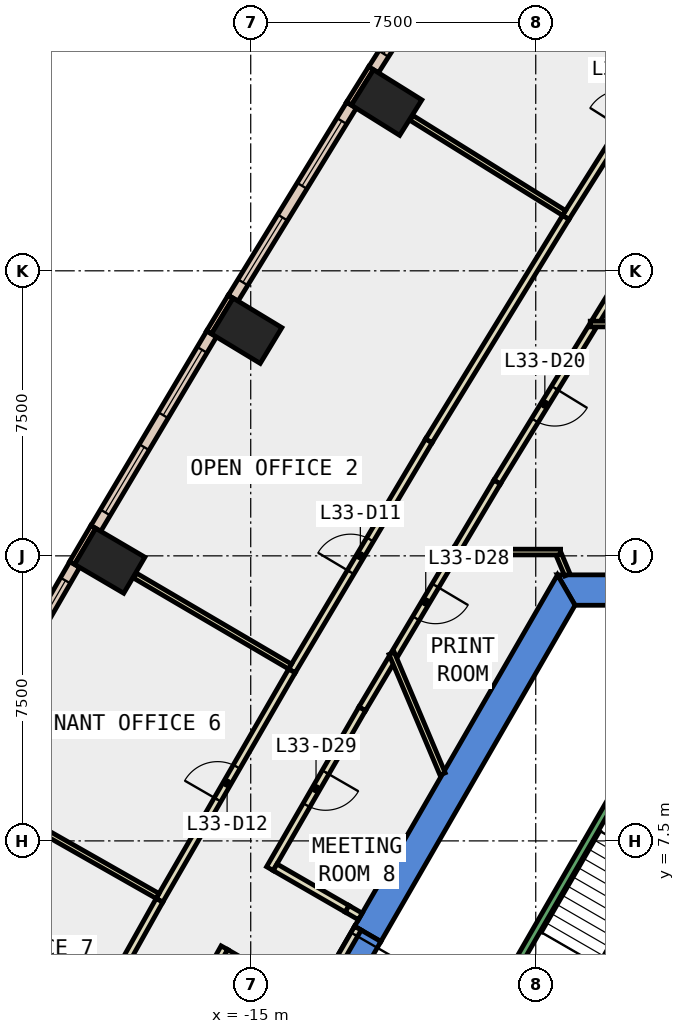
"""IFC4 building model, lengths in metres.
Left out: names, types, materials, properties, quantities, classifications, styles, units other than length and angle.
Written with IfcOpenShell. Run it as: python <this file> out.ifc"""

import sys

from ifc_helpers import new_model, si_unit, direction, frame, frame_2d, origin, origin_2d, place, context, subcontext, project, spatial, polyline, rectangle, outline, extrude, element, fill, save


model = new_model("IFC4")
c1 = context("Model", 3, precision=1e-05, world=origin(), true_north=direction((0.0, 1.0)))
c2 = subcontext(c1, "Body", "Model", "MODEL_VIEW")
j1 = project(units=[si_unit("LENGTHUNIT", "METRE"), si_unit("PLANEANGLEUNIT", "RADIAN")], contexts=[c1])
p1 = place(None, origin())
s1 = spatial("IfcSite", under=j1, at=p1, CompositionType="ELEMENT")
p2 = place(p1, origin())
s2 = spatial("IfcBuilding", under=s1, at=p2, CompositionType="ELEMENT")
p3 = place(p2, frame((0.0, 0.0, 150.8)))
s3 = spatial("IfcBuildingStorey", under=s2, at=p3, CompositionType="ELEMENT", Elevation=150.8)
for number, where, z_axis, x_axis in (
    (1, (-11.425, 26.928, -0.4), (0.0, 0.0, 1.0), (0.53, 0.848, 0.0)),
    (2, (-15.107, 20.923, -0.4), (0.0, 0.0, 1.0), (0.518, 0.855, 0.0)),
    (3, (-18.71, 14.87, -0.4), (0.0, 0.0, 1.0), (0.506, 0.863, 0.0)),
):
    element("IfcColumn", number, at=place(p3, frame(where, z_axis=z_axis, x_axis=x_axis)), inside=s3, PredefinedType="COLUMN", context=c2, shape_type="SweptSolid", body=[
        extrude(rectangle(XDim=1.1, YDim=1.5, at=origin_2d()), origin(), (0.0, 0.0, 1.0), 4.2),
    ])
p4 = place(p3, frame((0.0, 0.0, -0.4)))
e4 = element("IfcWall", 4, at=p4, inside=s3, PredefinedType="SHEAR", context=c2, shape_type="SweptSolid", body=[
    extrude(outline(polyline([(6.928, 14.5), (-6.928, 14.5), (-6.466, 13.7), (6.466, 13.7), (6.928, 14.5)])), origin(), (0.0, 0.0, 1.0), 4.2),
])
p5 = place(p3, frame((0.0, 0.0, -0.4)))
e5 = element("IfcWall", 5, at=p5, inside=s3, PredefinedType="SHEAR", context=c2, shape_type="SweptSolid", body=[
    extrude(outline(polyline([(-12.267, 5.252), (-11.575, 4.852), (-6.466, 13.7), (-6.928, 14.5), (-12.267, 5.252)])), origin(), (0.0, 0.0, 1.0), 4.2),
])
p6 = place(p3, frame((0.0, 0.0, 3.6)))
e6 = element("IfcWall", 6, at=p6, inside=s3, PredefinedType="SHEAR", context=c2, shape_type="SweptSolid", body=[
    extrude(outline(polyline([(-13.267, 3.52), (-12.575, 3.12), (-11.575, 4.852), (-12.267, 5.252), (-13.267, 3.52)])), origin(), (0.0, 0.0, 1.0), 0.2),
])
for number, where, z_axis, x_axis in (
    (7, (-11.833, 27.832, 0.0), (0.0, 0.0, 1.0), (-0.53, -0.848, 0.0)),
    (8, (-15.528, 21.821, 0.0), (0.0, 0.0, 1.0), (-0.518, -0.855, 0.0)),
):
    element("IfcWall", number, at=place(p3, frame(where, z_axis=z_axis, x_axis=x_axis)), inside=s3, PredefinedType="STANDARD", context=c2, shape_type="SweptSolid", body=[
        extrude(rectangle(XDim=1.1, YDim=0.15, at=frame_2d((0.55, 0.0))), origin(), (0.0, 0.0, 1.0), 3.8),
    ])
p7 = place(p3, frame((-19.143, 15.761, 0.0), z_axis=(0.0, 0.0, 1.0), x_axis=(-0.506505715302, -0.862236603472, 0.0)))
e9 = element("IfcWall", 9, at=p7, inside=s3, PredefinedType="STANDARD", context=c2, shape_type="SweptSolid", body=[
    extrude(rectangle(XDim=1.099, YDim=0.15, at=frame_2d((0.55, 0.0))), origin(), (0.0, 0.0, 1.0), 3.8),
])
p8 = place(p3, frame((-8.566, 32.855, 0.0), z_axis=(0.0, 0.0, 1.0), x_axis=(-0.534262775953, -0.845318452556, 0.0)))
e10 = element("IfcWall", 10, at=p8, inside=s3, PredefinedType="STANDARD", context=c2, shape_type="SweptSolid", body=[
    extrude(rectangle(XDim=5.992, YDim=0.3, at=frame_2d((2.996, 0.0))), origin(), (0.0, 0.0, 1.0), 3.8),
])
p9 = place(p8, frame((0.498, 0.0, 0.9)))
e11 = element("IfcOpeningElement", 11, at=p9, cuts=e10, PredefinedType="OPENING", context=c2, shape_type="SweptSolid", body=[
    extrude(rectangle(XDim=2.0, YDim=2.6, at=frame_2d((1.0, 1.3))), frame((0.0, 0.16, 0.0), z_axis=(0.0, -1.0, 0.0), x_axis=(1.0, 0.0, 0.0)), (0.0, 0.0, 1.0), 0.32),
])
p10 = place(p8, frame((3.494, 0.0, 0.9)))
e12 = element("IfcOpeningElement", 12, at=p10, cuts=e10, PredefinedType="OPENING", context=c2, shape_type="SweptSolid", body=[
    extrude(rectangle(XDim=2.0, YDim=2.6, at=frame_2d((1.0, 1.3))), frame((0.0, 0.16, 0.0), z_axis=(0.0, -1.0, 0.0), x_axis=(1.0, 0.0, 0.0)), (0.0, 0.0, 1.0), 0.32),
])
p11 = place(p3, frame((-12.348, 26.858, 0.0), z_axis=(0.0, 0.0, 1.0), x_axis=(-0.522704272908, -0.852514072074, 0.0)))
e13 = element("IfcWall", 13, at=p11, inside=s3, PredefinedType="STANDARD", context=c2, shape_type="SweptSolid", body=[
    extrude(rectangle(XDim=5.958, YDim=0.3, at=frame_2d((2.979, 0.0))), origin(), (0.0, 0.0, 1.0), 3.8),
])
p12 = place(p11, frame((0.489, 0.0, 0.9)))
e14 = element("IfcOpeningElement", 14, at=p12, cuts=e13, PredefinedType="OPENING", context=c2, shape_type="SweptSolid", body=[
    extrude(rectangle(XDim=2.0, YDim=2.6, at=frame_2d((1.0, 1.3))), frame((0.0, 0.16, 0.0), z_axis=(0.0, -1.0, 0.0), x_axis=(1.0, 0.0, 0.0)), (0.0, 0.0, 1.0), 0.32),
])
p13 = place(p11, frame((3.468, 0.0, 0.9)))
e15 = element("IfcOpeningElement", 15, at=p13, cuts=e13, PredefinedType="OPENING", context=c2, shape_type="SweptSolid", body=[
    extrude(rectangle(XDim=2.0, YDim=2.6, at=frame_2d((1.0, 1.3))), frame((0.0, 0.16, 0.0), z_axis=(0.0, -1.0, 0.0), x_axis=(1.0, 0.0, 0.0)), (0.0, 0.0, 1.0), 0.32),
])
p14 = place(p3, frame((-16.029, 20.84, 0.0), z_axis=(0.0, 0.0, 1.0), x_axis=(-0.511455040009, -0.859310038374, 0.0)))
e16 = element("IfcWall", 16, at=p14, inside=s3, PredefinedType="STANDARD", context=c2, shape_type="SweptSolid", body=[
    extrude(rectangle(XDim=5.957, YDim=0.3, at=frame_2d((2.979, 0.0))), origin(), (0.0, 0.0, 1.0), 3.8),
])
p15 = place(p14, frame((0.489, 0.0, 0.9)))
e17 = element("IfcOpeningElement", 17, at=p15, cuts=e16, PredefinedType="OPENING", context=c2, shape_type="SweptSolid", body=[
    extrude(rectangle(XDim=2.0, YDim=2.6, at=frame_2d((1.0, 1.3))), frame((0.0, 0.16, 0.0), z_axis=(0.0, -1.0, 0.0), x_axis=(1.0, 0.0, 0.0)), (0.0, 0.0, 1.0), 0.32),
])
p16 = place(p14, frame((3.468, 0.0, 0.9)))
e18 = element("IfcOpeningElement", 18, at=p16, cuts=e16, PredefinedType="OPENING", context=c2, shape_type="SweptSolid", body=[
    extrude(rectangle(XDim=2.0, YDim=2.6, at=frame_2d((1.0, 1.3))), frame((0.0, 0.16, 0.0), z_axis=(0.0, -1.0, 0.0), x_axis=(1.0, 0.0, 0.0)), (0.0, 0.0, 1.0), 0.32),
])
p17 = place(p3, frame((-19.631, 14.774, 0.0), z_axis=(0.0, 0.0, 1.0), x_axis=(-0.500061823953, -0.865989706766, 0.0)))
e19 = element("IfcWall", 19, at=p17, inside=s3, PredefinedType="STANDARD", context=c2, shape_type="SweptSolid", body=[
    extrude(rectangle(XDim=5.957, YDim=0.3, at=frame_2d((2.979, 0.0))), origin(), (0.0, 0.0, 1.0), 3.8),
])
p18 = place(p17, frame((0.489, 0.0, 0.9)))
e20 = element("IfcOpeningElement", 20, at=p18, cuts=e19, PredefinedType="OPENING", context=c2, shape_type="SweptSolid", body=[
    extrude(rectangle(XDim=2.0, YDim=2.6, at=frame_2d((1.0, 1.3))), frame((0.0, 0.16, 0.0), z_axis=(0.0, -1.0, 0.0), x_axis=(1.0, 0.0, 0.0)), (0.0, 0.0, 1.0), 0.32),
])
p19 = place(p17, frame((3.468, 0.0, 0.9)))
e21 = element("IfcOpeningElement", 21, at=p19, cuts=e19, PredefinedType="OPENING", context=c2, shape_type="SweptSolid", body=[
    extrude(rectangle(XDim=2.0, YDim=2.6, at=frame_2d((1.0, 1.3))), frame((0.0, 0.16, 0.0), z_axis=(0.0, -1.0, 0.0), x_axis=(1.0, 0.0, 0.0)), (0.0, 0.0, 1.0), 0.32),
])
p20 = place(p3, frame((-9.574, 15.164, 0.0), z_axis=(0.0, 0.0, 1.0), x_axis=(-0.511482522046, -0.859293680671, 0.0)))
e22 = element("IfcWall", 22, at=p20, inside=s3, PredefinedType="PARTITIONING", context=c2, shape_type="SweptSolid", body=[
    extrude(rectangle(XDim=3.208, YDim=0.2, at=frame_2d((1.604, 0.0))), origin(), (0.0, 0.0, 1.0), 3.8),
])
p21 = place(p20, frame((1.104, 0.0, 0.0)))
e23 = element("IfcOpeningElement", 23, at=p21, cuts=e22, PredefinedType="OPENING", context=c2, shape_type="SweptSolid", body=[
    extrude(rectangle(XDim=1.0, YDim=2.1, at=frame_2d((0.5, 1.05))), frame((0.0, 0.11, 0.0), z_axis=(0.0, -1.0, 0.0), x_axis=(1.0, 0.0, 0.0)), (0.0, 0.0, 1.0), 0.22),
])
p22 = place(p3, frame((-11.291, 12.278, 0.0), z_axis=(0.0, 0.0, 1.0), x_axis=(-0.511628198266, -0.859206952217, 0.0)))
e24 = element("IfcWall", 24, at=p22, inside=s3, PredefinedType="PARTITIONING", context=c2, shape_type="SweptSolid", body=[
    extrude(rectangle(XDim=1.517, YDim=0.2, at=frame_2d((0.758, 0.0))), origin(), (0.0, 0.0, 1.0), 3.8),
])
p23 = place(p3, frame((-12.067, 10.975, 0.0), z_axis=(0.0, 0.0, 1.0), x_axis=(-0.500215616273, -0.865900881878, 0.0)))
e25 = element("IfcWall", 25, at=p23, inside=s3, PredefinedType="PARTITIONING", context=c2, shape_type="SweptSolid", body=[
    extrude(rectangle(XDim=4.856, YDim=0.2, at=frame_2d((2.428, 0.0))), origin(), (0.0, 0.0, 1.0), 3.8),
])
p24 = place(p23, frame((1.928, 0.0, 0.0)))
e26 = element("IfcOpeningElement", 26, at=p24, cuts=e25, PredefinedType="OPENING", context=c2, shape_type="SweptSolid", body=[
    extrude(rectangle(XDim=1.0, YDim=2.1, at=frame_2d((0.5, 1.05))), frame((0.0, 0.11, 0.0), z_axis=(0.0, -1.0, 0.0), x_axis=(1.0, 0.0, 0.0)), (0.0, 0.0, 1.0), 0.22),
])
p25 = place(p3, frame((-14.359, 6.806, 0.0), z_axis=(0.0, 0.0, 1.0), x_axis=(0.866155875717, -0.499773947861, 0.0)))
e27 = element("IfcWall", 27, at=p25, inside=s3, PredefinedType="PARTITIONING", context=c2, shape_type="SweptSolid", body=[
    extrude(rectangle(XDim=2.189, YDim=0.2, at=frame_2d((1.094, 0.0))), origin(), (0.0, 0.0, 1.0), 3.8),
])
p26 = place(p3, frame((-6.005, 21.036, 0.0), z_axis=(0.0, 0.0, 1.0), x_axis=(-0.522865983217, -0.852414901086, 0.0)))
e28 = element("IfcWall", 28, at=p26, inside=s3, PredefinedType="PARTITIONING", context=c2, shape_type="SweptSolid", body=[
    extrude(rectangle(XDim=4.803, YDim=0.2, at=frame_2d((2.401, 0.0))), origin(), (0.0, 0.0, 1.0), 3.8),
])
p27 = place(p26, frame((1.901, 0.0, 0.0)))
e29 = element("IfcOpeningElement", 29, at=p27, cuts=e28, PredefinedType="OPENING", context=c2, shape_type="SweptSolid", body=[
    extrude(rectangle(XDim=1.0, YDim=2.1, at=frame_2d((0.5, 1.05))), frame((0.0, 0.11, 0.0), z_axis=(0.0, -1.0, 0.0), x_axis=(1.0, 0.0, 0.0)), (0.0, 0.0, 1.0), 0.22),
])
p28 = place(p3, frame((-8.516, 16.942, 0.0), z_axis=(0.0, 0.0, 1.0), x_axis=(-0.511351070319, -0.859371911854, 0.0)))
e30 = element("IfcWall", 30, at=p28, inside=s3, PredefinedType="PARTITIONING", context=c2, shape_type="SweptSolid", body=[
    extrude(rectangle(XDim=2.069, YDim=0.2, at=frame_2d((1.034, 0.0))), origin(), (0.0, 0.0, 1.0), 3.8),
])
p29 = place(p3, frame((-4.887, 22.86, 0.0), z_axis=(0.0, 0.0, 1.0), x_axis=(-0.522754838565, -0.852483066552, 0.0)))
e31 = element("IfcWall", 31, at=p29, inside=s3, PredefinedType="PARTITIONING", context=c2, shape_type="SweptSolid", body=[
    extrude(rectangle(XDim=1.99, YDim=0.2, at=frame_2d((0.995, 0.0))), origin(), (0.0, 0.0, 1.0), 3.8),
])
p30 = place(p3, frame((-15.692, 4.689, 0.0), z_axis=(0.0, 0.0, 1.0), x_axis=(-0.48849233301, -0.872568186786, 0.0)))
e32 = element("IfcWall", 32, at=p30, inside=s3, PredefinedType="PARTITIONING", context=c2, shape_type="SweptSolid", body=[
    extrude(rectangle(XDim=6.629, YDim=0.2, at=frame_2d((3.314, 0.0))), origin(), (0.0, 0.0, 1.0), 3.8),
])
p31 = place(p30, frame((2.814, 0.0, 0.0)))
e33 = element("IfcOpeningElement", 33, at=p31, cuts=e32, PredefinedType="OPENING", context=c2, shape_type="SweptSolid", body=[
    extrude(rectangle(XDim=1.0, YDim=2.1, at=frame_2d((0.5, 1.05))), frame((0.0, 0.11, 0.0), z_axis=(0.0, -1.0, 0.0), x_axis=(1.0, 0.0, 0.0)), (0.0, 0.0, 1.0), 0.22),
])
p32 = place(p3, frame((-6.71, 23.906, 0.0), z_axis=(0.0, 0.0, 1.0), x_axis=(0.534211624298, 0.845350779538, 0.0)))
e34 = element("IfcWall", 34, at=p32, inside=s3, PredefinedType="PARTITIONING", context=c2, shape_type="SweptSolid", body=[
    extrude(rectangle(XDim=6.553, YDim=0.2, at=frame_2d((3.277, 0.0))), origin(), (0.0, 0.0, 1.0), 3.8),
])
p33 = place(p32, frame((2.777, 0.0, 0.0)))
e35 = element("IfcOpeningElement", 35, at=p33, cuts=e34, PredefinedType="OPENING", context=c2, shape_type="SweptSolid", body=[
    extrude(rectangle(XDim=1.0, YDim=2.1, at=frame_2d((0.5, 1.05))), frame((0.0, 0.11, 0.0), z_axis=(0.0, -1.0, 0.0), x_axis=(1.0, 0.0, 0.0)), (0.0, 0.0, 1.0), 0.22),
])
p34 = place(p3, frame((-13.917, 11.973, 0.0), z_axis=(0.0, 0.0, 1.0), x_axis=(0.511455840413, 0.859309561978, 0.0)))
e36 = element("IfcWall", 36, at=p34, inside=s3, PredefinedType="PARTITIONING", context=c2, shape_type="SweptSolid", body=[
    extrude(rectangle(XDim=7.047, YDim=0.2, at=frame_2d((3.523, 0.0))), origin(), (0.0, 0.0, 1.0), 3.8),
])
p35 = place(p34, frame((3.023, 0.0, 0.0)))
e37 = element("IfcOpeningElement", 37, at=p35, cuts=e36, PredefinedType="OPENING", context=c2, shape_type="SweptSolid", body=[
    extrude(rectangle(XDim=1.0, YDim=2.1, at=frame_2d((0.5, 1.05))), frame((0.0, 0.11, 0.0), z_axis=(0.0, -1.0, 0.0), x_axis=(1.0, 0.0, 0.0)), (0.0, 0.0, 1.0), 0.22),
])
p36 = place(p3, frame((-10.313, 18.028, 0.0), z_axis=(0.0, 0.0, 1.0), x_axis=(0.522772968793, 0.85247194857, 0.0)))
e38 = element("IfcWall", 38, at=p36, inside=s3, PredefinedType="PARTITIONING", context=c2, shape_type="SweptSolid", body=[
    extrude(rectangle(XDim=6.894, YDim=0.2, at=frame_2d((3.447, 0.0))), origin(), (0.0, 0.0, 1.0), 3.8),
])
p37 = place(p3, frame((-17.402, 5.936, 0.0), z_axis=(0.0, 0.0, 1.0), x_axis=(0.500135788517, 0.865946992052, 0.0)))
e39 = element("IfcWall", 39, at=p37, inside=s3, PredefinedType="PARTITIONING", context=c2, shape_type="SweptSolid", body=[
    extrude(rectangle(XDim=6.97, YDim=0.2, at=frame_2d((3.485, 0.0))), origin(), (0.0, 0.0, 1.0), 3.8),
])
p38 = place(p37, frame((3.06, 0.0, 0.0)))
e40 = element("IfcOpeningElement", 40, at=p38, cuts=e39, PredefinedType="OPENING", context=c2, shape_type="SweptSolid", body=[
    extrude(rectangle(XDim=1.0, YDim=2.1, at=frame_2d((0.5, 1.05))), frame((0.0, 0.11, 0.0), z_axis=(0.0, -1.0, 0.0), x_axis=(1.0, 0.0, 0.0)), (0.0, 0.0, 1.0), 0.22),
])
p39 = place(p3, frame((-20.769, -0.082, 0.0), z_axis=(0.0, 0.0, 1.0), x_axis=(0.488387759141, 0.872626722443, 0.0)))
e41 = element("IfcWall", 41, at=p39, inside=s3, PredefinedType="PARTITIONING", context=c2, shape_type="SweptSolid", body=[
    extrude(rectangle(XDim=6.896, YDim=0.2, at=frame_2d((3.448, 0.0))), origin(), (0.0, 0.0, 1.0), 3.8),
])
p40 = place(p3, frame((-9.952, 9.262, 0.0), z_axis=(0.0, 0.0, 1.0), x_axis=(-0.38905491579, 0.921214563769, 0.0)))
e42 = element("IfcWall", 42, at=p40, inside=s3, PredefinedType="PARTITIONING", context=c2, shape_type="SweptSolid", body=[
    extrude(rectangle(XDim=3.445, YDim=0.15, at=frame_2d((1.722, 0.0))), origin(), (0.0, 0.0, 1.0), 3.8),
])
p41 = place(p3, frame((-6.846, 15.1, 0.0), z_axis=(0.0, 0.0, 1.0), x_axis=(-1.0, 0.0, 0.0)))
e43 = element("IfcWall", 43, at=p41, inside=s3, PredefinedType="PARTITIONING", context=c2, shape_type="SweptSolid", body=[
    extrude(rectangle(XDim=2.766, YDim=0.15, at=frame_2d((1.383, 0.0))), origin(), (0.0, 0.0, 1.0), 3.8),
])
p42 = place(p3, frame((-6.668, 14.5, 0.0), z_axis=(0.0, 0.0, 1.0), x_axis=(-0.388852201086, 0.921300149631, 0.0)))
e44 = element("IfcWall", 44, at=p42, inside=s3, PredefinedType="PARTITIONING", context=c2, shape_type="SweptSolid", body=[
    extrude(rectangle(XDim=0.576, YDim=0.15, at=frame_2d((0.288, 0.0))), origin(), (0.0, 0.0, 1.0), 3.8),
])
p43 = place(p3, frame((-6.066, 21.1, 0.0), z_axis=(0.0, 0.0, 1.0), x_axis=(1.0, 0.0, 0.0)))
e45 = element("IfcWall", 45, at=p43, inside=s3, PredefinedType="PARTITIONING", context=c2, shape_type="SweptSolid", body=[
    extrude(rectangle(XDim=5.666, YDim=0.15, at=frame_2d((2.833, 0.0))), origin(), (0.0, 0.0, 1.0), 3.8),
])
p44 = place(p3, frame((-6.755, 24.023, 0.0), z_axis=(0.0, 0.0, 1.0), x_axis=(-0.848896034983, 0.528559856392, 0.0)))
e46 = element("IfcWall", 46, at=p44, inside=s3, PredefinedType="PARTITIONING", context=c2, shape_type="SweptSolid", body=[
    extrude(rectangle(XDim=4.73, YDim=0.15, at=frame_2d((2.365, 0.0))), origin(), (0.0, 0.0, 1.0), 3.8),
])
p45 = place(p3, frame((-13.965, 12.088, 0.0), z_axis=(0.0, 0.0, 1.0), x_axis=(-0.862617990649, 0.50585591052, 0.0)))
e47 = element("IfcWall", 47, at=p45, inside=s3, PredefinedType="PARTITIONING", context=c2, shape_type="SweptSolid", body=[
    extrude(rectangle(XDim=4.731, YDim=0.15, at=frame_2d((2.365, 0.0))), origin(), (0.0, 0.0, 1.0), 3.8),
])
p46 = place(p3, frame((-17.451, 6.051, 0.0), z_axis=(0.0, 0.0, 1.0), x_axis=(-0.869409691741, 0.494091882049, 0.0)))
e48 = element("IfcWall", 48, at=p46, inside=s3, PredefinedType="PARTITIONING", context=c2, shape_type="SweptSolid", body=[
    extrude(rectangle(XDim=4.73, YDim=0.15, at=frame_2d((2.365, 0.0))), origin(), (0.0, 0.0, 1.0), 3.8),
])
p47 = place(p3, frame((-12.18, 5.202, 0.0), z_axis=(0.0, 0.0, 1.0), x_axis=(-0.50002537861, -0.866010750942, 0.0)))
e49 = element("IfcWall", 49, at=p47, inside=s3, PredefinedType="PARTITIONING", context=c2, shape_type="SweptSolid", body=[
    extrude(rectangle(XDim=2.0, YDim=0.2, at=frame_2d((1.0, 0.0))), origin(), (0.0, 0.0, 1.0), 2.4),
])
p48 = place(p47, frame((0.19, 0.0, 0.0)))
e50 = element("IfcOpeningElement", 50, at=p48, cuts=e49, PredefinedType="OPENING", context=c2, shape_type="SweptSolid", body=[
    extrude(rectangle(XDim=1.8, YDim=2.1, at=frame_2d((0.9, 1.05))), frame((0.0, 0.11, 0.0), z_axis=(0.0, -1.0, 0.0), x_axis=(1.0, 0.0, 0.0)), (0.0, 0.0, 1.0), 0.22),
])
p49 = place(p3, frame((-12.463, 5.712, 0.0), z_axis=(0.0, 0.0, 1.0), x_axis=(0.865788603161, -0.500409926597, 0.0)))
e51 = element("IfcWall", 51, at=p49, inside=s3, PredefinedType="PARTITIONING", context=c2, shape_type="SweptSolid", body=[
    extrude(rectangle(XDim=0.4, YDim=0.2, at=frame_2d((0.2, 0.0))), origin(), (0.0, 0.0, 1.0), 2.4),
])
p50 = place(p3, frame((-13.764, 3.46, 0.0), z_axis=(0.0, 0.0, 1.0), x_axis=(-0.865872609263, 0.500264554538, 0.0)))
e52 = element("IfcWall", 52, at=p50, inside=s3, PredefinedType="PARTITIONING", context=c2, shape_type="SweptSolid", body=[
    extrude(rectangle(XDim=2.183, YDim=0.2, at=frame_2d((1.091, 0.0))), origin(), (0.0, 0.0, 1.0), 3.8),
])
p51 = place(p3, frame((-5.03, 9.388, 0.0), z_axis=(0.0, 0.0, 1.0), x_axis=(-0.499978703459, -0.866037698999, 0.0)))
e53 = element("IfcWall", 53, at=p51, inside=s3, PredefinedType="STANDARD", context=c2, shape_type="SweptSolid", body=[
    extrude(rectangle(XDim=6.9, YDim=0.2, at=frame_2d((3.45, 0.0))), origin(), (0.0, 0.0, 1.0), 3.8),
])
p52 = place(p10, origin())
e54 = element("IfcWindow", 54, at=p52, inside=s3, PartitioningType="SINGLE_PANEL", PredefinedType="WINDOW", context=c2, shape_type="SweptSolid", body=[
    extrude(rectangle(XDim=2.0, YDim=2.6, at=frame_2d((1.0, 1.3))), frame((0.0, 0.03, 0.0), z_axis=(0.0, -1.0, 0.0), x_axis=(1.0, 0.0, 0.0)), (0.0, 0.0, 1.0), 0.06),
])
fill(e12, e54)
p53 = place(p12, origin())
e55 = element("IfcWindow", 55, at=p53, inside=s3, PartitioningType="SINGLE_PANEL", PredefinedType="WINDOW", context=c2, shape_type="SweptSolid", body=[
    extrude(rectangle(XDim=2.0, YDim=2.6, at=frame_2d((1.0, 1.3))), frame((0.0, 0.03, 0.0), z_axis=(0.0, -1.0, 0.0), x_axis=(1.0, 0.0, 0.0)), (0.0, 0.0, 1.0), 0.06),
])
fill(e14, e55)
p54 = place(p13, origin())
e56 = element("IfcWindow", 56, at=p54, inside=s3, PartitioningType="SINGLE_PANEL", PredefinedType="WINDOW", context=c2, shape_type="SweptSolid", body=[
    extrude(rectangle(XDim=2.0, YDim=2.6, at=frame_2d((1.0, 1.3))), frame((0.0, 0.03, 0.0), z_axis=(0.0, -1.0, 0.0), x_axis=(1.0, 0.0, 0.0)), (0.0, 0.0, 1.0), 0.06),
])
fill(e15, e56)
p55 = place(p15, origin())
e57 = element("IfcWindow", 57, at=p55, inside=s3, PartitioningType="SINGLE_PANEL", PredefinedType="WINDOW", context=c2, shape_type="SweptSolid", body=[
    extrude(rectangle(XDim=2.0, YDim=2.6, at=frame_2d((1.0, 1.3))), frame((0.0, 0.03, 0.0), z_axis=(0.0, -1.0, 0.0), x_axis=(1.0, 0.0, 0.0)), (0.0, 0.0, 1.0), 0.06),
])
fill(e17, e57)
p56 = place(p16, origin())
e58 = element("IfcWindow", 58, at=p56, inside=s3, PartitioningType="SINGLE_PANEL", PredefinedType="WINDOW", context=c2, shape_type="SweptSolid", body=[
    extrude(rectangle(XDim=2.0, YDim=2.6, at=frame_2d((1.0, 1.3))), frame((0.0, 0.03, 0.0), z_axis=(0.0, -1.0, 0.0), x_axis=(1.0, 0.0, 0.0)), (0.0, 0.0, 1.0), 0.06),
])
fill(e18, e58)
p57 = place(p18, origin())
e59 = element("IfcWindow", 59, at=p57, inside=s3, PartitioningType="SINGLE_PANEL", PredefinedType="WINDOW", context=c2, shape_type="SweptSolid", body=[
    extrude(rectangle(XDim=2.0, YDim=2.6, at=frame_2d((1.0, 1.3))), frame((0.0, 0.03, 0.0), z_axis=(0.0, -1.0, 0.0), x_axis=(1.0, 0.0, 0.0)), (0.0, 0.0, 1.0), 0.06),
])
fill(e20, e59)
p58 = place(p35, origin())
e60 = element("IfcDoor", 60, at=p58, inside=s3, OperationType="SINGLE_SWING_LEFT", PredefinedType="DOOR", context=c2, shape_type="SweptSolid", body=[
    extrude(rectangle(XDim=1.0, YDim=2.1, at=frame_2d((0.5, 1.05))), frame((0.0, 0.025, 0.0), z_axis=(0.0, -1.0, 0.0), x_axis=(1.0, 0.0, 0.0)), (0.0, 0.0, 1.0), 0.05),
])
fill(e37, e60)
p59 = place(p38, origin())
e61 = element("IfcDoor", 61, at=p59, inside=s3, OperationType="SINGLE_SWING_LEFT", PredefinedType="DOOR", context=c2, shape_type="SweptSolid", body=[
    extrude(rectangle(XDim=1.0, YDim=2.1, at=frame_2d((0.5, 1.05))), frame((0.0, 0.025, 0.0), z_axis=(0.0, -1.0, 0.0), x_axis=(1.0, 0.0, 0.0)), (0.0, 0.0, 1.0), 0.05),
])
fill(e40, e61)
p60 = place(p27, origin())
e62 = element("IfcDoor", 62, at=p60, inside=s3, OperationType="SINGLE_SWING_LEFT", PredefinedType="DOOR", context=c2, shape_type="SweptSolid", body=[
    extrude(rectangle(XDim=1.0, YDim=2.1, at=frame_2d((0.5, 1.05))), frame((0.0, 0.025, 0.0), z_axis=(0.0, -1.0, 0.0), x_axis=(1.0, 0.0, 0.0)), (0.0, 0.0, 1.0), 0.05),
])
fill(e29, e62)
p61 = place(p21, origin())
e63 = element("IfcDoor", 63, at=p61, inside=s3, OperationType="SINGLE_SWING_RIGHT", PredefinedType="DOOR", context=c2, shape_type="SweptSolid", body=[
    extrude(rectangle(XDim=1.0, YDim=2.1, at=frame_2d((0.5, 1.05))), frame((0.0, 0.025, 0.0), z_axis=(0.0, -1.0, 0.0), x_axis=(1.0, 0.0, 0.0)), (0.0, 0.0, 1.0), 0.05),
])
fill(e23, e63)
p62 = place(p24, origin())
e64 = element("IfcDoor", 64, at=p62, inside=s3, OperationType="SINGLE_SWING_LEFT", PredefinedType="DOOR", context=c2, shape_type="SweptSolid", body=[
    extrude(rectangle(XDim=1.0, YDim=2.1, at=frame_2d((0.5, 1.05))), frame((0.0, 0.025, 0.0), z_axis=(0.0, -1.0, 0.0), x_axis=(1.0, 0.0, 0.0)), (0.0, 0.0, 1.0), 0.05),
])
fill(e26, e64)
p63 = place(p48, origin())
e65 = element("IfcDoor", 65, at=p63, inside=s3, OperationType="DOUBLE_DOOR_SINGLE_SWING", PredefinedType="DOOR", context=c2, shape_type="SweptSolid", body=[
    extrude(rectangle(XDim=1.8, YDim=2.1, at=frame_2d((0.9, 1.05))), frame((0.0, 0.025, 0.0), z_axis=(0.0, -1.0, 0.0), x_axis=(1.0, 0.0, 0.0)), (0.0, 0.0, 1.0), 0.05),
])
fill(e50, e65)
save(model, sys.argv[1])
